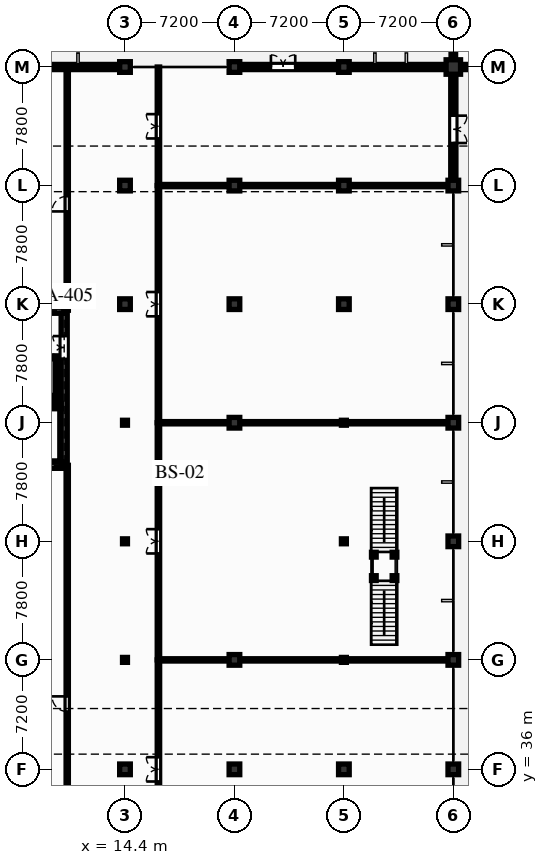
"""IFC4 building model, lengths in metres.
Left out: names, types, materials, properties, quantities, classifications, styles, units other than length and angle.
Written with IfcOpenShell. Run it as: python <this file> out.ifc"""

import sys

from ifc_helpers import new_model, si_unit, direction, frame, frame_2d, origin, origin_2d, place, context, subcontext, project, spatial, rectangle, hollow_circle, i_section, extrude, element, fill, save


model = new_model("IFC4")
c1 = context("Model", 3, precision=1e-05, world=origin(), true_north=direction((0.0, 1.0)))
c2 = subcontext(c1, "Body", "Model", "MODEL_VIEW")
j1 = project(units=[si_unit("LENGTHUNIT", "METRE"), si_unit("PLANEANGLEUNIT", "RADIAN")], contexts=[c1])
p1 = place(None, origin())
s1 = spatial("IfcSite", under=j1, at=p1, CompositionType="ELEMENT")
p2 = place(p1, origin())
s2 = spatial("IfcBuilding", under=s1, at=p2, CompositionType="ELEMENT")
p3 = place(p2, origin())
s3 = spatial("IfcBuildingStorey", under=s2, at=p3, CompositionType="ELEMENT", Elevation=0.0)
p4 = place(p3, frame((14.4, 36.0, 0.0), z_axis=(0.0, 0.0, 1.0), x_axis=(1.0, 0.0, 0.0)))
e1 = element("IfcColumn", 1, at=p4, inside=s3, PredefinedType="COLUMN", context=c2, shape_type="SweptSolid", body=[
    extrude(rectangle(XDim=0.7, YDim=0.7, at=origin_2d()), origin(), (0.0, 0.0, 1.0), 5.1),
])
for number, where, z_axis, x_axis in (
    (2, (14.4, 43.2, 0.0), (0.0, 0.0, 1.0), (1.0, 0.0, 0.0)),
    (3, (14.4, 51.0, 0.0), (0.0, 0.0, 1.0), (1.0, 0.0, 0.0)),
    (4, (14.4, 58.8, 0.0), (0.0, 0.0, 1.0), (1.0, 0.0, 0.0)),
):
    element("IfcColumn", number, at=place(p3, frame(where, z_axis=z_axis, x_axis=x_axis)), inside=s3, PredefinedType="COLUMN", context=c2, shape_type="SweptSolid", body=[
        extrude(hollow_circle(Radius=0.162, WallThickness=0.012, at=origin_2d()), origin(), (0.0, 0.0, 1.0), 5.1),
    ])
for number, where, z_axis, x_axis in (
    (5, (14.4, 66.6, 0.0), (0.0, 0.0, 1.0), (1.0, 0.0, 0.0)),
    (6, (14.4, 74.4, 0.0), (0.0, 0.0, 1.0), (1.0, 0.0, 0.0)),
    (7, (14.4, 82.2, 0.0), (0.0, 0.0, 1.0), (1.0, 0.0, 0.0)),
    (8, (21.6, 36.0, 0.0), (0.0, 0.0, 1.0), (1.0, 0.0, 0.0)),
    (9, (21.6, 43.2, 0.0), (0.0, 0.0, 1.0), (1.0, 0.0, 0.0)),
    (10, (21.6, 58.8, 0.0), (0.0, 0.0, 1.0), (1.0, 0.0, 0.0)),
    (11, (21.6, 66.6, 0.0), (0.0, 0.0, 1.0), (1.0, 0.0, 0.0)),
    (12, (21.6, 74.4, 0.0), (0.0, 0.0, 1.0), (1.0, 0.0, 0.0)),
    (13, (21.6, 82.2, 0.0), (0.0, 0.0, 1.0), (1.0, 0.0, 0.0)),
    (14, (28.8, 36.0, 0.0), (0.0, 0.0, 1.0), (1.0, 0.0, 0.0)),
):
    element("IfcColumn", number, at=place(p3, frame(where, z_axis=z_axis, x_axis=x_axis)), inside=s3, PredefinedType="COLUMN", context=c2, shape_type="SweptSolid", body=[
        extrude(rectangle(XDim=0.7, YDim=0.7, at=origin_2d()), origin(), (0.0, 0.0, 1.0), 5.1),
    ])
for number, where, z_axis, x_axis in (
    (15, (28.8, 43.2, 0.0), (0.0, 0.0, 1.0), (1.0, 0.0, 0.0)),
    (16, (28.8, 51.0, 0.0), (0.0, 0.0, 1.0), (1.0, 0.0, 0.0)),
    (17, (28.8, 58.8, 0.0), (0.0, 0.0, 1.0), (1.0, 0.0, 0.0)),
):
    element("IfcColumn", number, at=place(p3, frame(where, z_axis=z_axis, x_axis=x_axis)), inside=s3, PredefinedType="COLUMN", context=c2, shape_type="SweptSolid", body=[
        extrude(hollow_circle(Radius=0.162, WallThickness=0.012, at=origin_2d()), origin(), (0.0, 0.0, 1.0), 5.1),
    ])
for number, where, z_axis, x_axis in (
    (18, (28.8, 66.6, 0.0), (0.0, 0.0, 1.0), (1.0, 0.0, 0.0)),
    (19, (28.8, 74.4, 0.0), (0.0, 0.0, 1.0), (1.0, 0.0, 0.0)),
    (20, (28.8, 82.2, 0.0), (0.0, 0.0, 1.0), (1.0, 0.0, 0.0)),
    (21, (36.0, 36.0, 0.0), (0.0, 0.0, 1.0), (1.0, 0.0, 0.0)),
    (22, (36.0, 43.2, 0.0), (0.0, 0.0, 1.0), (1.0, 0.0, 0.0)),
    (23, (36.0, 51.0, 0.0), (0.0, 0.0, 1.0), (1.0, 0.0, 0.0)),
    (24, (36.0, 58.8, 0.0), (0.0, 0.0, 1.0), (1.0, 0.0, 0.0)),
    (25, (36.0, 66.6, 0.0), (0.0, 0.0, 1.0), (1.0, 0.0, 0.0)),
    (26, (36.0, 74.4, 0.0), (0.0, 0.0, 1.0), (1.0, 0.0, 0.0)),
):
    element("IfcColumn", number, at=place(p3, frame(where, z_axis=z_axis, x_axis=x_axis)), inside=s3, PredefinedType="COLUMN", context=c2, shape_type="SweptSolid", body=[
        extrude(rectangle(XDim=0.7, YDim=0.7, at=origin_2d()), origin(), (0.0, 0.0, 1.0), 5.1),
    ])
p5 = place(p3, frame((36.0, 82.2, 0.0), z_axis=(0.0, 0.0, 1.0), x_axis=(1.0, 0.0, 0.0)))
e27 = element("IfcColumn", 27, at=p5, inside=s3, PredefinedType="COLUMN", context=c2, shape_type="SweptSolid", body=[
    extrude(rectangle(XDim=0.95, YDim=0.95, at=origin_2d()), origin(), (0.0, 0.0, 1.0), 5.1),
])
for number, where, z_axis, x_axis in (
    (28, (30.77, 48.58, 0.0), (0.0, 0.0, 1.0), (1.0, 0.0, 0.0)),
    (29, (32.13, 48.58, 0.0), (0.0, 0.0, 1.0), (1.0, 0.0, 0.0)),
    (30, (30.77, 50.12, 0.0), (0.0, 0.0, 1.0), (1.0, 0.0, 0.0)),
    (31, (32.13, 50.12, 0.0), (0.0, 0.0, 1.0), (1.0, 0.0, 0.0)),
):
    element("IfcColumn", number, at=place(p3, frame(where, z_axis=z_axis, x_axis=x_axis)), inside=s3, PredefinedType="COLUMN", context=c2, shape_type="SweptSolid", body=[
        extrude(i_section(OverallWidth=0.307, OverallDepth=0.315, WebThickness=0.012, FlangeThickness=0.019, at=origin_2d()), origin(), (0.0, 0.0, 1.0), 2.33),
    ])
p6 = place(p3, frame((36.0, 82.2, 0.0), z_axis=(0.0, 0.0, 1.0), x_axis=(1.0, 0.0, 0.0)))
e32 = element("IfcWall", 32, at=p6, inside=s3, PredefinedType="SOLIDWALL", context=c2, shape_type="SweptSolid", body=[
    extrude(rectangle(XDim=9.0, YDim=0.34, at=frame_2d((4.5, 0.0))), origin(), (0.0, 0.0, 1.0), 4.8),
])
p7 = place(p6, frame((1.8, 0.0, 0.85)))
e33 = element("IfcOpeningElement", 33, at=p7, cuts=e32, PredefinedType="OPENING", context=c2, shape_type="SweptSolid", body=[
    extrude(rectangle(XDim=1.5, YDim=2.1, at=frame_2d((0.75, 1.05))), frame((0.0, 0.18, 0.0), z_axis=(0.0, -1.0, 0.0), x_axis=(1.0, 0.0, 0.0)), (0.0, 0.0, 1.0), 0.36),
])
p8 = place(p6, frame((5.4, 0.0, 0.85)))
e34 = element("IfcOpeningElement", 34, at=p8, cuts=e32, PredefinedType="OPENING", context=c2, shape_type="SweptSolid", body=[
    extrude(rectangle(XDim=1.2, YDim=2.1, at=frame_2d((0.6, 1.05))), frame((0.0, 0.18, 0.0), z_axis=(0.0, -1.0, 0.0), x_axis=(1.0, 0.0, 0.0)), (0.0, 0.0, 1.0), 0.36),
])
p9 = place(p3, frame((36.0, 82.2, 0.0), z_axis=(0.0, 0.0, 1.0), x_axis=(0.0, 1.0, 0.0)))
e35 = element("IfcWall", 35, at=p9, inside=s3, PredefinedType="SOLIDWALL", context=c2, shape_type="SweptSolid", body=[
    extrude(rectangle(XDim=31.8, YDim=0.3, at=frame_2d((15.9, 0.0))), origin(), (0.0, 0.0, 1.0), 4.095),
])
p10 = place(p9, frame((3.0, 0.0, 0.95)))
e36 = element("IfcOpeningElement", 36, at=p10, cuts=e35, PredefinedType="OPENING", context=c2, shape_type="SweptSolid", body=[
    extrude(rectangle(XDim=1.35, YDim=1.85, at=frame_2d((0.675, 0.925))), frame((0.0, 0.16, 0.0), z_axis=(0.0, -1.0, 0.0), x_axis=(1.0, 0.0, 0.0)), (0.0, 0.0, 1.0), 0.32),
])
p11 = place(p9, frame((9.5, 0.0, 0.95)))
e37 = element("IfcOpeningElement", 37, at=p11, cuts=e35, PredefinedType="OPENING", context=c2, shape_type="SweptSolid", body=[
    extrude(rectangle(XDim=1.05, YDim=1.75, at=frame_2d((0.525, 0.875))), frame((0.0, 0.16, 0.0), z_axis=(0.0, -1.0, 0.0), x_axis=(1.0, 0.0, 0.0)), (0.0, 0.0, 1.0), 0.32),
])
p12 = place(p9, frame((16.5, 0.0, 0.95)))
e38 = element("IfcOpeningElement", 38, at=p12, cuts=e35, PredefinedType="OPENING", context=c2, shape_type="SweptSolid", body=[
    extrude(rectangle(XDim=1.5, YDim=2.1, at=frame_2d((0.75, 1.05))), frame((0.0, 0.16, 0.0), z_axis=(0.0, -1.0, 0.0), x_axis=(1.0, 0.0, 0.0)), (0.0, 0.0, 1.0), 0.32),
])
p13 = place(p3, frame((36.0, 74.4, 0.0), z_axis=(0.0, 0.0, 1.0), x_axis=(0.0, 1.0, 0.0)))
e39 = element("IfcWall", 39, at=p13, inside=s3, PredefinedType="SOLIDWALL", context=c2, shape_type="SweptSolid", body=[
    extrude(rectangle(XDim=7.8, YDim=0.34, at=frame_2d((3.9, 0.0))), origin(), (0.0, 0.0, 1.0), 4.8),
])
p14 = place(p13, frame((2.8, 0.0, 0.0)))
e40 = element("IfcOpeningElement", 40, at=p14, cuts=e39, PredefinedType="OPENING", context=c2, shape_type="SweptSolid", body=[
    extrude(rectangle(XDim=1.8, YDim=2.6, at=frame_2d((0.9, 1.3))), frame((0.0, 0.18, 0.0), z_axis=(0.0, -1.0, 0.0), x_axis=(1.0, 0.0, 0.0)), (0.0, 0.0, 1.0), 0.36),
])
p15 = place(p3, frame((7.2, 82.2, 0.0), z_axis=(0.0, 0.0, 1.0), x_axis=(1.0, 0.0, 0.0)))
e41 = element("IfcWall", 41, at=p15, inside=s3, PredefinedType="SOLIDWALL", context=c2, shape_type="SweptSolid", body=[
    extrude(rectangle(XDim=7.2, YDim=0.34, at=frame_2d((3.6, 0.0))), origin(), (0.0, 0.0, 1.0), 4.8),
])
p16 = place(p15, frame((4.4, 0.0, 0.9)))
e42 = element("IfcOpeningElement", 42, at=p16, cuts=e41, PredefinedType="OPENING", context=c2, shape_type="SweptSolid", body=[
    extrude(rectangle(XDim=1.75, YDim=2.15, at=frame_2d((0.875, 1.075))), frame((0.0, 0.18, 0.0), z_axis=(0.0, -1.0, 0.0), x_axis=(1.0, 0.0, 0.0)), (0.0, 0.0, 1.0), 0.36),
])
p17 = place(p3, frame((21.6, 82.2, 0.0), z_axis=(0.0, 0.0, 1.0), x_axis=(1.0, 0.0, 0.0)))
e43 = element("IfcWall", 43, at=p17, inside=s3, PredefinedType="SOLIDWALL", context=c2, shape_type="SweptSolid", body=[
    extrude(rectangle(XDim=7.2, YDim=0.34, at=frame_2d((3.6, 0.0))), origin(), (0.0, 0.0, 1.0), 4.8),
])
p18 = place(p17, frame((2.4, 0.0, 0.0)))
e44 = element("IfcOpeningElement", 44, at=p18, cuts=e43, PredefinedType="OPENING", context=c2, shape_type="SweptSolid", body=[
    extrude(rectangle(XDim=1.6, YDim=2.4, at=frame_2d((0.8, 1.2))), frame((0.0, 0.18, 0.0), z_axis=(0.0, -1.0, 0.0), x_axis=(1.0, 0.0, 0.0)), (0.0, 0.0, 1.0), 0.36),
])
p19 = place(p3, frame((28.8, 82.2, 0.0), z_axis=(0.0, 0.0, 1.0), x_axis=(1.0, 0.0, 0.0)))
e45 = element("IfcWall", 45, at=p19, inside=s3, PredefinedType="SOLIDWALL", context=c2, shape_type="SweptSolid", body=[
    extrude(rectangle(XDim=7.2, YDim=0.34, at=frame_2d((3.6, 0.0))), origin(), (0.0, 0.0, 1.0), 4.8),
])
p20 = place(p19, frame((2.2, 0.0, 0.9)))
e46 = element("IfcOpeningElement", 46, at=p20, cuts=e45, PredefinedType="OPENING", context=c2, shape_type="SweptSolid", body=[
    extrude(rectangle(XDim=1.75, YDim=2.15, at=frame_2d((0.875, 1.075))), frame((0.0, 0.18, 0.0), z_axis=(0.0, -1.0, 0.0), x_axis=(1.0, 0.0, 0.0)), (0.0, 0.0, 1.0), 0.36),
])
for number, where, z_axis, x_axis in (
    (47, (0.17, 56.0, 0.0), (0.0, 0.0, 1.0), (1.0, 0.0, 0.0)),
    (48, (0.17, 66.2, 0.0), (0.0, 0.0, 1.0), (1.0, 0.0, 0.0)),
):
    element("IfcWall", number, at=place(p3, frame(where, z_axis=z_axis, x_axis=x_axis)), inside=s3, PredefinedType="SHEAR", context=c2, shape_type="SweptSolid", body=[
        extrude(rectangle(XDim=10.23, YDim=0.4, at=frame_2d((5.115, 0.0))), origin(), (0.0, 0.0, 1.0), 4.8),
    ])
p21 = place(p3, frame((10.4, 56.2, 0.0), z_axis=(0.0, 0.0, 1.0), x_axis=(0.0, 1.0, 0.0)))
e49 = element("IfcWall", 49, at=p21, inside=s3, PredefinedType="SHEAR", context=c2, shape_type="SweptSolid", body=[
    extrude(rectangle(XDim=9.8, YDim=0.4, at=frame_2d((4.9, 0.0))), origin(), (0.0, 0.0, 1.0), 4.8),
])
p22 = place(p21, frame((6.8, 0.0, 0.0)))
e50 = element("IfcOpeningElement", 50, at=p22, cuts=e49, PredefinedType="OPENING", context=c2, shape_type="SweptSolid", body=[
    extrude(rectangle(XDim=1.5, YDim=2.2, at=frame_2d((0.75, 1.1))), frame((0.0, 0.21, 0.0), z_axis=(0.0, -1.0, 0.0), x_axis=(1.0, 0.0, 0.0)), (0.0, 0.0, 1.0), 0.42),
])
p23 = place(p3, frame((0.17, 59.895, 0.0), z_axis=(0.0, 0.0, 1.0), x_axis=(1.0, 0.0, 0.0)))
e51 = element("IfcWall", 51, at=p23, inside=s3, PredefinedType="SHEAR", context=c2, shape_type="SweptSolid", body=[
    extrude(rectangle(XDim=10.03, YDim=0.35, at=frame_2d((5.015, 0.0))), origin(), (0.0, 0.0, 1.0), 4.8),
])
p24 = place(p23, frame((0.45, 0.0, 0.0)))
e52 = element("IfcOpeningElement", 52, at=p24, cuts=e51, PredefinedType="OPENING", context=c2, shape_type="SweptSolid", body=[
    extrude(rectangle(XDim=1.05, YDim=2.2, at=frame_2d((0.525, 1.1))), frame((0.0, 0.185, 0.0), z_axis=(0.0, -1.0, 0.0), x_axis=(1.0, 0.0, 0.0)), (0.0, 0.0, 1.0), 0.37),
])
p25 = place(p3, frame((7.9, 60.5, 0.0), z_axis=(0.0, 0.0, 1.0), x_axis=(1.0, 0.0, 0.0)))
e53 = element("IfcWall", 53, at=p25, inside=s3, PredefinedType="PARTITIONING", context=c2, shape_type="SweptSolid", body=[
    extrude(rectangle(XDim=2.0, YDim=0.2, at=frame_2d((1.0, 0.0))), origin(), (0.0, 0.0, 1.0), 4.8),
])
p26 = place(p3, frame((7.9, 63.1, 0.0), z_axis=(0.0, 0.0, 1.0), x_axis=(1.0, 0.0, 0.0)))
e54 = element("IfcWall", 54, at=p26, inside=s3, PredefinedType="PARTITIONING", context=c2, shape_type="SweptSolid", body=[
    extrude(rectangle(XDim=2.0, YDim=0.2, at=frame_2d((1.0, 0.0))), origin(), (0.0, 0.0, 1.0), 4.8),
])
p27 = place(p26, frame((0.55, 0.0, 0.0)))
e55 = element("IfcOpeningElement", 55, at=p27, cuts=e54, PredefinedType="OPENING", context=c2, shape_type="SweptSolid", body=[
    extrude(rectangle(XDim=0.9, YDim=2.1, at=frame_2d((0.45, 1.05))), frame((0.0, 0.11, 0.0), z_axis=(0.0, -1.0, 0.0), x_axis=(1.0, 0.0, 0.0)), (0.0, 0.0, 1.0), 0.22),
])
p28 = place(p3, frame((9.9, 60.7, 0.0), z_axis=(0.0, 0.0, 1.0), x_axis=(0.0, 1.0, 0.0)))
e56 = element("IfcWall", 56, at=p28, inside=s3, PredefinedType="PARTITIONING", context=c2, shape_type="SweptSolid", body=[
    extrude(rectangle(XDim=2.2, YDim=0.2, at=frame_2d((1.1, 0.0))), origin(), (0.0, 0.0, 1.0), 4.8),
])
p29 = place(p3, frame((16.6, 28.8, 0.0), z_axis=(0.0, 0.0, 1.0), x_axis=(0.0, 1.0, 0.0)))
e57 = element("IfcWall", 57, at=p29, inside=s3, PredefinedType="PARTITIONING", context=c2, shape_type="SweptSolid", body=[
    extrude(rectangle(XDim=14.4, YDim=0.16, at=frame_2d((7.2, 0.0))), origin(), (0.0, 0.0, 1.0), 4.348),
])
p30 = place(p29, frame((6.4, 0.0, 0.0)))
e58 = element("IfcOpeningElement", 58, at=p30, cuts=e57, PredefinedType="OPENING", context=c2, shape_type="SweptSolid", body=[
    extrude(rectangle(XDim=1.6, YDim=2.2, at=frame_2d((0.8, 1.1))), frame((0.0, 0.09, 0.0), z_axis=(0.0, -1.0, 0.0), x_axis=(1.0, 0.0, 0.0)), (0.0, 0.0, 1.0), 0.18),
])
p31 = place(p3, frame((16.6, 43.2, 0.0), z_axis=(0.0, 0.0, 1.0), x_axis=(0.0, 1.0, 0.0)))
e59 = element("IfcWall", 59, at=p31, inside=s3, PredefinedType="PARTITIONING", context=c2, shape_type="SweptSolid", body=[
    extrude(rectangle(XDim=15.6, YDim=0.16, at=frame_2d((7.8, 0.0))), origin(), (0.0, 0.0, 1.0), 4.8),
])
p32 = place(p31, frame((7.0, 0.0, 0.0)))
e60 = element("IfcOpeningElement", 60, at=p32, cuts=e59, PredefinedType="OPENING", context=c2, shape_type="SweptSolid", body=[
    extrude(rectangle(XDim=1.6, YDim=2.2, at=frame_2d((0.8, 1.1))), frame((0.0, 0.09, 0.0), z_axis=(0.0, -1.0, 0.0), x_axis=(1.0, 0.0, 0.0)), (0.0, 0.0, 1.0), 0.18),
])
p33 = place(p3, frame((16.6, 43.2, 0.0), z_axis=(0.0, 0.0, 1.0), x_axis=(1.0, 0.0, 0.0)))
e61 = element("IfcWall", 61, at=p33, inside=s3, PredefinedType="PARTITIONING", context=c2, shape_type="SweptSolid", body=[
    extrude(rectangle(XDim=19.4, YDim=0.15, at=frame_2d((9.7, 0.0))), origin(), (0.0, 0.0, 1.0), 4.333),
])
p34 = place(p3, frame((16.6, 58.8, 0.0), z_axis=(0.0, 0.0, 1.0), x_axis=(0.0, 1.0, 0.0)))
e62 = element("IfcWall", 62, at=p34, inside=s3, PredefinedType="PARTITIONING", context=c2, shape_type="SweptSolid", body=[
    extrude(rectangle(XDim=15.6, YDim=0.16, at=frame_2d((7.8, 0.0))), origin(), (0.0, 0.0, 1.0), 4.203),
])
p35 = place(p34, frame((7.0, 0.0, 0.0)))
e63 = element("IfcOpeningElement", 63, at=p35, cuts=e62, PredefinedType="OPENING", context=c2, shape_type="SweptSolid", body=[
    extrude(rectangle(XDim=1.6, YDim=2.2, at=frame_2d((0.8, 1.1))), frame((0.0, 0.09, 0.0), z_axis=(0.0, -1.0, 0.0), x_axis=(1.0, 0.0, 0.0)), (0.0, 0.0, 1.0), 0.18),
])
p36 = place(p3, frame((16.6, 58.8, 0.0), z_axis=(0.0, 0.0, 1.0), x_axis=(1.0, 0.0, 0.0)))
e64 = element("IfcWall", 64, at=p36, inside=s3, PredefinedType="PARTITIONING", context=c2, shape_type="SweptSolid", body=[
    extrude(rectangle(XDim=19.4, YDim=0.15, at=frame_2d((9.7, 0.0))), origin(), (0.0, 0.0, 1.0), 4.203),
])
p37 = place(p3, frame((16.6, 74.4, 0.0), z_axis=(0.0, 0.0, 1.0), x_axis=(0.0, 1.0, 0.0)))
e65 = element("IfcWall", 65, at=p37, inside=s3, PredefinedType="PARTITIONING", context=c2, shape_type="SweptSolid", body=[
    extrude(rectangle(XDim=7.8, YDim=0.16, at=frame_2d((3.9, 0.0))), origin(), (0.0, 0.0, 1.0), 4.49),
])
p38 = place(p37, frame((3.1, 0.0, 0.0)))
e66 = element("IfcOpeningElement", 66, at=p38, cuts=e65, PredefinedType="OPENING", context=c2, shape_type="SweptSolid", body=[
    extrude(rectangle(XDim=1.6, YDim=2.2, at=frame_2d((0.8, 1.1))), frame((0.0, 0.09, 0.0), z_axis=(0.0, -1.0, 0.0), x_axis=(1.0, 0.0, 0.0)), (0.0, 0.0, 1.0), 0.18),
])
p39 = place(p3, frame((16.6, 74.4, 0.0), z_axis=(0.0, 0.0, 1.0), x_axis=(1.0, 0.0, 0.0)))
e67 = element("IfcWall", 67, at=p39, inside=s3, PredefinedType="PARTITIONING", context=c2, shape_type="SweptSolid", body=[
    extrude(rectangle(XDim=19.4, YDim=0.15, at=frame_2d((9.7, 0.0))), origin(), (0.0, 0.0, 1.0), 4.348),
])
p40 = place(p3, frame((10.6, 28.8, 0.0), z_axis=(0.0, 0.0, 1.0), x_axis=(0.0, 1.0, 0.0)))
e68 = element("IfcWall", 68, at=p40, inside=s3, PredefinedType="PARTITIONING", context=c2, shape_type="SweptSolid", body=[
    extrude(rectangle(XDim=27.2, YDim=0.15, at=frame_2d((13.6, 0.0))), origin(), (0.0, 0.0, 1.0), 4.459),
])
p41 = place(p40, frame((11.0, 0.0, 0.0)))
e69 = element("IfcOpeningElement", 69, at=p41, cuts=e68, PredefinedType="OPENING", context=c2, shape_type="SweptSolid", body=[
    extrude(rectangle(XDim=1.0, YDim=2.15, at=frame_2d((0.5, 1.075))), frame((0.0, 0.085, 0.0), z_axis=(0.0, -1.0, 0.0), x_axis=(1.0, 0.0, 0.0)), (0.0, 0.0, 1.0), 0.17),
])
p42 = place(p3, frame((10.6, 66.2, 0.0), z_axis=(0.0, 0.0, 1.0), x_axis=(0.0, 1.0, 0.0)))
e70 = element("IfcWall", 70, at=p42, inside=s3, PredefinedType="PARTITIONING", context=c2, shape_type="SweptSolid", body=[
    extrude(rectangle(XDim=16.0, YDim=0.15, at=frame_2d((8.0, 0.0))), origin(), (0.0, 0.0, 1.0), 4.8),
])
p43 = place(p42, frame((6.5, 0.0, 0.0)))
e71 = element("IfcOpeningElement", 71, at=p43, cuts=e70, PredefinedType="OPENING", context=c2, shape_type="SweptSolid", body=[
    extrude(rectangle(XDim=1.0, YDim=2.15, at=frame_2d((0.5, 1.075))), frame((0.0, 0.085, 0.0), z_axis=(0.0, -1.0, 0.0), x_axis=(1.0, 0.0, 0.0)), (0.0, 0.0, 1.0), 0.17),
])
p44 = place(p14, frame((1.8, 0.0, 0.0), z_axis=(0.0, 0.0, 1.0), x_axis=(-1.0, 0.0, 0.0)))
e72 = element("IfcDoor", 72, at=p44, inside=s3, OperationType="DOUBLE_DOOR_SINGLE_SWING", PredefinedType="DOOR", context=c2, shape_type="SweptSolid", body=[
    extrude(rectangle(XDim=1.8, YDim=2.6, at=frame_2d((0.9, 1.3))), frame((0.0, 0.025, 0.0), z_axis=(0.0, -1.0, 0.0), x_axis=(1.0, 0.0, 0.0)), (0.0, 0.0, 1.0), 0.05),
])
fill(e40, e72)
p45 = place(p16, origin())
e73 = element("IfcWindow", 73, at=p45, inside=s3, PartitioningType="SINGLE_PANEL", PredefinedType="WINDOW", context=c2, shape_type="SweptSolid", body=[
    extrude(rectangle(XDim=1.75, YDim=2.15, at=frame_2d((0.875, 1.075))), frame((0.0, 0.03, 0.0), z_axis=(0.0, -1.0, 0.0), x_axis=(1.0, 0.0, 0.0)), (0.0, 0.0, 1.0), 0.06),
])
fill(e42, e73)
p46 = place(p18, origin())
e74 = element("IfcDoor", 74, at=p46, inside=s3, OperationType="DOUBLE_DOOR_SINGLE_SWING", PredefinedType="DOOR", context=c2, shape_type="SweptSolid", body=[
    extrude(rectangle(XDim=1.6, YDim=2.4, at=frame_2d((0.8, 1.2))), frame((0.0, 0.025, 0.0), z_axis=(0.0, -1.0, 0.0), x_axis=(1.0, 0.0, 0.0)), (0.0, 0.0, 1.0), 0.05),
])
fill(e44, e74)
p47 = place(p20, origin())
e75 = element("IfcWindow", 75, at=p47, inside=s3, PartitioningType="SINGLE_PANEL", PredefinedType="WINDOW", context=c2, shape_type="SweptSolid", body=[
    extrude(rectangle(XDim=1.75, YDim=2.15, at=frame_2d((0.875, 1.075))), frame((0.0, 0.03, 0.0), z_axis=(0.0, -1.0, 0.0), x_axis=(1.0, 0.0, 0.0)), (0.0, 0.0, 1.0), 0.06),
])
fill(e46, e75)
p48 = place(p22, origin())
e76 = element("IfcDoor", 76, at=p48, inside=s3, OperationType="DOUBLE_DOOR_SINGLE_SWING", PredefinedType="DOOR", context=c2, shape_type="SweptSolid", body=[
    extrude(rectangle(XDim=1.5, YDim=2.2, at=frame_2d((0.75, 1.1))), frame((0.0, 0.025, 0.0), z_axis=(0.0, -1.0, 0.0), x_axis=(1.0, 0.0, 0.0)), (0.0, 0.0, 1.0), 0.05),
])
fill(e50, e76)
p49 = place(p30, origin())
e77 = element("IfcDoor", 77, at=p49, inside=s3, OperationType="DOUBLE_DOOR_SINGLE_SWING", PredefinedType="DOOR", context=c2, shape_type="SweptSolid", body=[
    extrude(rectangle(XDim=1.6, YDim=2.2, at=frame_2d((0.8, 1.1))), frame((0.0, 0.025, 0.0), z_axis=(0.0, -1.0, 0.0), x_axis=(1.0, 0.0, 0.0)), (0.0, 0.0, 1.0), 0.05),
])
fill(e58, e77)
p50 = place(p32, origin())
e78 = element("IfcDoor", 78, at=p50, inside=s3, OperationType="DOUBLE_DOOR_SINGLE_SWING", PredefinedType="DOOR", context=c2, shape_type="SweptSolid", body=[
    extrude(rectangle(XDim=1.6, YDim=2.2, at=frame_2d((0.8, 1.1))), frame((0.0, 0.025, 0.0), z_axis=(0.0, -1.0, 0.0), x_axis=(1.0, 0.0, 0.0)), (0.0, 0.0, 1.0), 0.05),
])
fill(e60, e78)
p51 = place(p35, origin())
e79 = element("IfcDoor", 79, at=p51, inside=s3, OperationType="DOUBLE_DOOR_SINGLE_SWING", PredefinedType="DOOR", context=c2, shape_type="SweptSolid", body=[
    extrude(rectangle(XDim=1.6, YDim=2.2, at=frame_2d((0.8, 1.1))), frame((0.0, 0.025, 0.0), z_axis=(0.0, -1.0, 0.0), x_axis=(1.0, 0.0, 0.0)), (0.0, 0.0, 1.0), 0.05),
])
fill(e63, e79)
p52 = place(p38, origin())
e80 = element("IfcDoor", 80, at=p52, inside=s3, OperationType="DOUBLE_DOOR_SINGLE_SWING", PredefinedType="DOOR", context=c2, shape_type="SweptSolid", body=[
    extrude(rectangle(XDim=1.6, YDim=2.2, at=frame_2d((0.8, 1.1))), frame((0.0, 0.025, 0.0), z_axis=(0.0, -1.0, 0.0), x_axis=(1.0, 0.0, 0.0)), (0.0, 0.0, 1.0), 0.05),
])
fill(e66, e80)
p53 = place(p41, origin())
e81 = element("IfcDoor", 81, at=p53, inside=s3, OperationType="SINGLE_SWING_RIGHT", PredefinedType="DOOR", context=c2, shape_type="SweptSolid", body=[
    extrude(rectangle(XDim=1.0, YDim=2.15, at=frame_2d((0.5, 1.075))), frame((0.0, 0.025, 0.0), z_axis=(0.0, -1.0, 0.0), x_axis=(1.0, 0.0, 0.0)), (0.0, 0.0, 1.0), 0.05),
])
fill(e69, e81)
p54 = place(p43, origin())
e82 = element("IfcDoor", 82, at=p54, inside=s3, OperationType="SINGLE_SWING_LEFT", PredefinedType="DOOR", context=c2, shape_type="SweptSolid", body=[
    extrude(rectangle(XDim=1.0, YDim=2.15, at=frame_2d((0.5, 1.075))), frame((0.0, 0.025, 0.0), z_axis=(0.0, -1.0, 0.0), x_axis=(1.0, 0.0, 0.0)), (0.0, 0.0, 1.0), 0.05),
])
fill(e71, e82)
save(model, sys.argv[1])
